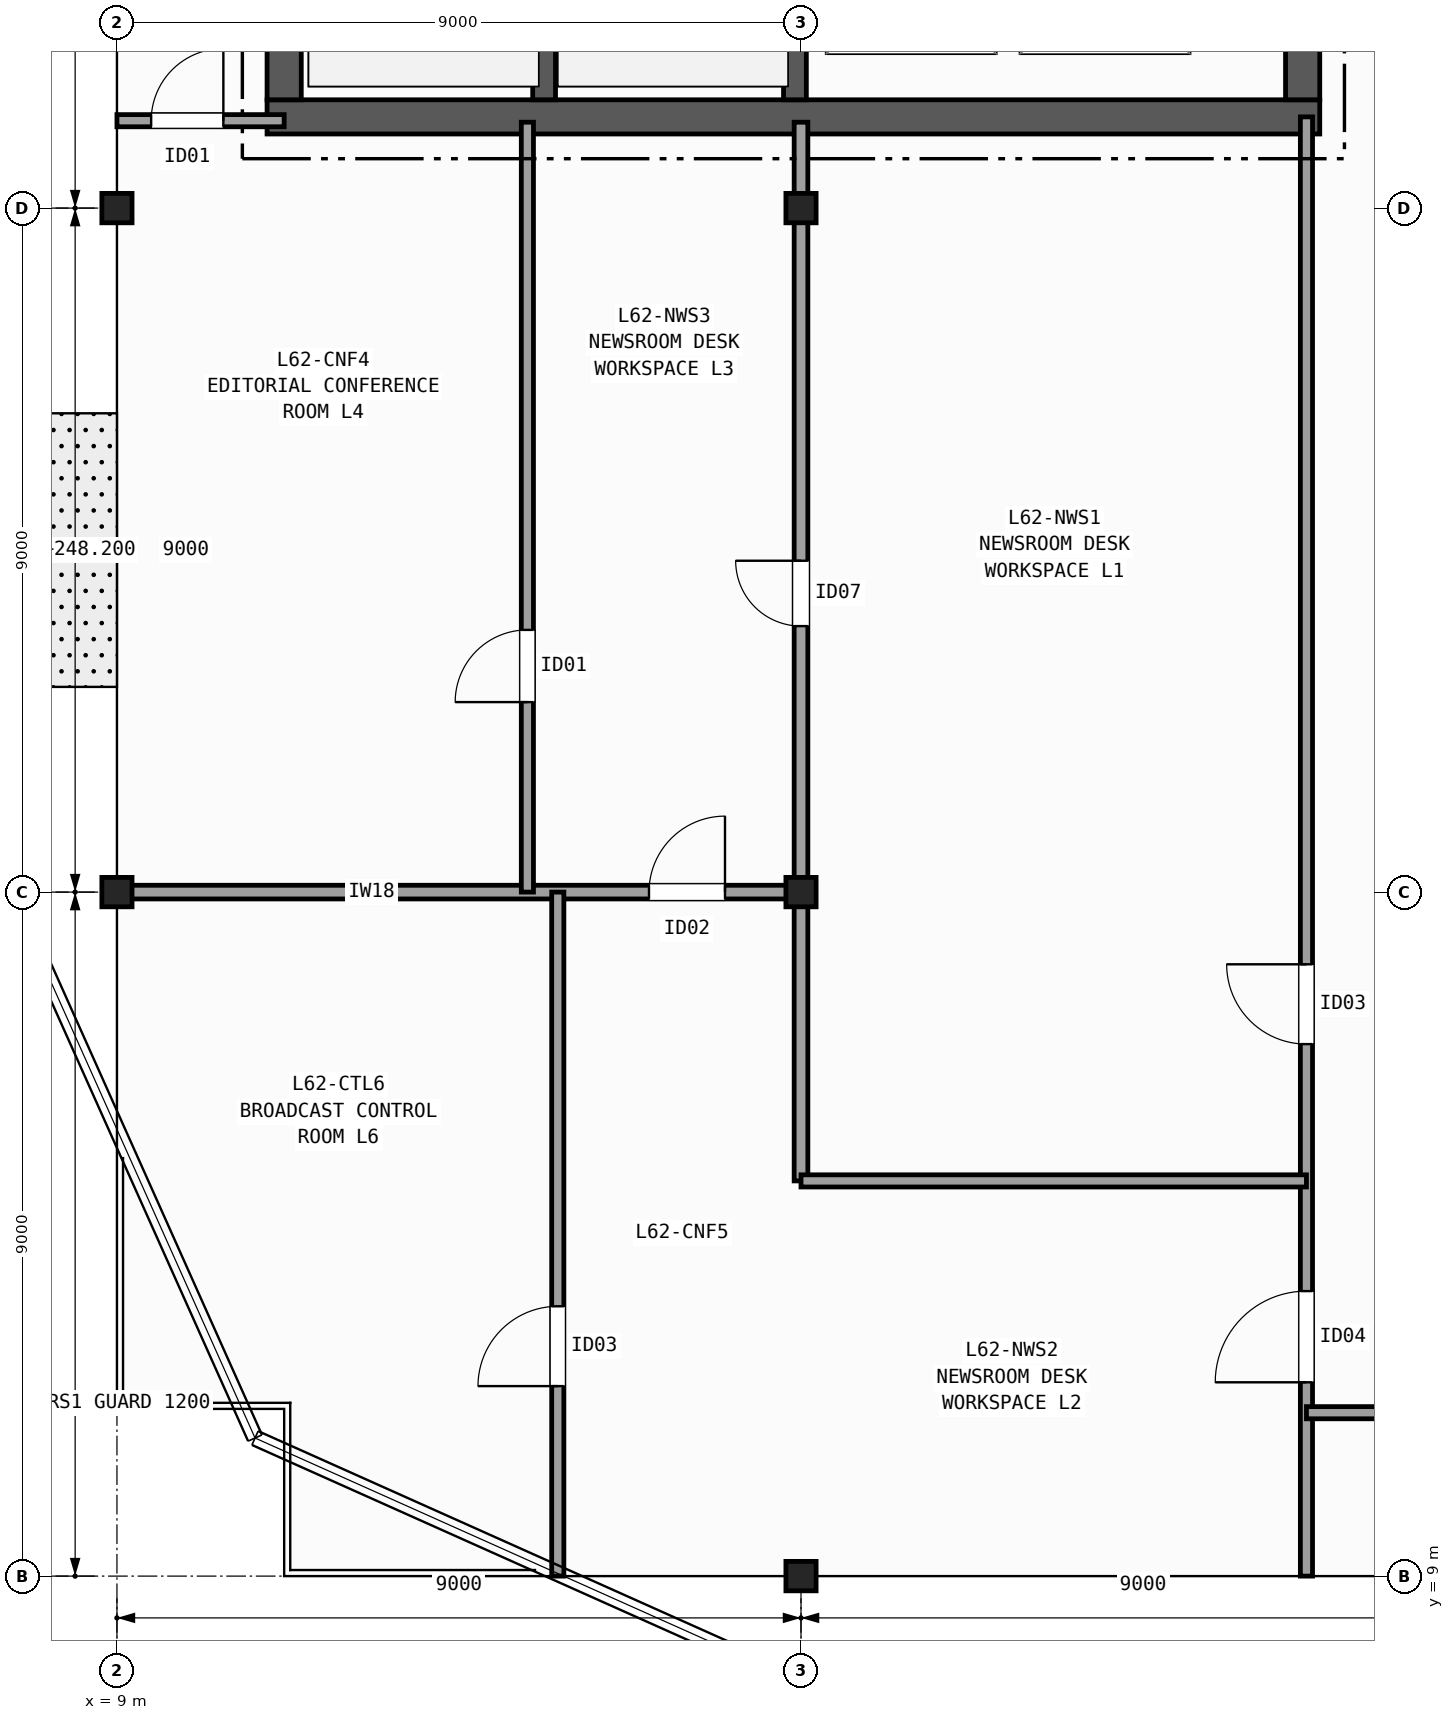
"""IFC4 building model, lengths in metres.
Left out: names, types, materials, properties, quantities, classifications, styles, units other than length and angle.
Written with IfcOpenShell. Run it as: python <this file> out.ifc"""

import sys

from ifc_helpers import new_model, si_unit, direction, frame, frame_2d, origin, origin_2d, place, context, subcontext, project, spatial, rectangle, i_section, extrude, element, fill, save


model = new_model("IFC4")
c1 = context("Model", 3, precision=1e-05, world=origin(), true_north=direction((0.0, 1.0)))
c2 = subcontext(c1, "Body", "Model", "MODEL_VIEW")
j1 = project(units=[si_unit("LENGTHUNIT", "METRE"), si_unit("PLANEANGLEUNIT", "RADIAN")], contexts=[c1])
p1 = place(None, origin())
s1 = spatial("IfcSite", under=j1, at=p1, CompositionType="ELEMENT")
p2 = place(p1, origin())
s2 = spatial("IfcBuilding", under=s1, at=p2, CompositionType="ELEMENT")
p3 = place(p2, frame((0.0, 0.0, 248.2)))
s3 = spatial("IfcBuildingStorey", under=s2, at=p3, CompositionType="ELEMENT", Elevation=248.2)
for number, where, z_axis, x_axis in (
    (1, (9.0, 18.0, 0.0), (0.0, 0.0, 1.0), (1.0, 0.0, 0.0)),
    (2, (9.0, 27.0, 0.0), (0.0, 0.0, 1.0), (1.0, 0.0, 0.0)),
    (3, (18.0, 9.0, 0.0), (0.0, 0.0, 1.0), (1.0, 0.0, 0.0)),
    (4, (18.0, 18.0, 0.0), (0.0, 0.0, 1.0), (1.0, 0.0, 0.0)),
    (5, (18.0, 27.0, 0.0), (0.0, 0.0, 1.0), (1.0, 0.0, 0.0)),
):
    element("IfcColumn", number, at=place(p3, frame(where, z_axis=z_axis, x_axis=x_axis)), inside=s3, PredefinedType="COLUMN", context=c2, shape_type="SweptSolid", body=[
        extrude(i_section(OverallWidth=0.397, OverallDepth=0.387, WebThickness=0.021, FlangeThickness=0.033, FilletRadius=0.015, at=origin_2d()), origin(), (0.0, 0.0, 1.0), 3.7),
    ])
p4 = place(p3, frame((10.975, 28.2, 0.0), z_axis=(0.0, 0.0, 1.0), x_axis=(1.0, 0.0, 0.0)))
e6 = element("IfcWall", 6, at=p4, inside=s3, PredefinedType="SHEAR", context=c2, shape_type="SweptSolid", body=[
    extrude(rectangle(XDim=13.85, YDim=0.45, at=frame_2d((6.925, 0.0))), origin(), (0.0, 0.0, 1.0), 3.42),
])
p5 = place(p3, frame((11.2, 42.175, 0.0), z_axis=(0.0, 0.0, 1.0), x_axis=(0.0, -1.0, 0.0)))
e7 = element("IfcWall", 7, at=p5, inside=s3, PredefinedType="SHEAR", context=c2, shape_type="SweptSolid", body=[
    extrude(rectangle(XDim=13.75, YDim=0.45, at=frame_2d((6.875, 0.0))), origin(), (0.0, 0.0, 1.0), 3.42),
])
p6 = place(p3, frame((24.6, 28.425, 0.0), z_axis=(0.0, 0.0, 1.0), x_axis=(0.0, 1.0, 0.0)))
e8 = element("IfcWall", 8, at=p6, inside=s3, PredefinedType="SHEAR", context=c2, shape_type="SweptSolid", body=[
    extrude(rectangle(XDim=13.75, YDim=0.45, at=frame_2d((6.875, 0.0))), origin(), (0.0, 0.0, 1.0), 3.42),
])
p7 = place(p6, frame((3.375, 0.0, 0.0)))
e9 = element("IfcOpeningElement", 9, at=p7, cuts=e8, PredefinedType="OPENING", context=c2, shape_type="SweptSolid", body=[
    extrude(rectangle(XDim=1.5, YDim=2.2, at=frame_2d((0.75, 1.1))), frame((0.0, 0.235, 0.0), z_axis=(0.0, -1.0, 0.0), x_axis=(1.0, 0.0, 0.0)), (0.0, 0.0, 1.0), 0.47),
])
p8 = place(p6, frame((9.975, 0.0, 0.0)))
e10 = element("IfcOpeningElement", 10, at=p8, cuts=e8, PredefinedType="OPENING", context=c2, shape_type="SweptSolid", body=[
    extrude(rectangle(XDim=0.9, YDim=2.1, at=frame_2d((0.45, 1.05))), frame((0.0, 0.235, 0.0), z_axis=(0.0, -1.0, 0.0), x_axis=(1.0, 0.0, 0.0)), (0.0, 0.0, 1.0), 0.47),
])
p9 = place(p6, frame((12.075, 0.0, 0.0)))
e11 = element("IfcOpeningElement", 11, at=p9, cuts=e8, PredefinedType="OPENING", context=c2, shape_type="SweptSolid", body=[
    extrude(rectangle(XDim=0.9, YDim=2.1, at=frame_2d((0.45, 1.05))), frame((0.0, 0.235, 0.0), z_axis=(0.0, -1.0, 0.0), x_axis=(1.0, 0.0, 0.0)), (0.0, 0.0, 1.0), 0.47),
])
p10 = place(p3, frame((14.62, 28.425, 0.0), z_axis=(0.0, 0.0, 1.0), x_axis=(0.0, 1.0, 0.0)))
e12 = element("IfcWall", 12, at=p10, inside=s3, PredefinedType="SHEAR", context=c2, shape_type="SweptSolid", body=[
    extrude(rectangle(XDim=9.025, YDim=0.3, at=frame_2d((4.512, 0.0))), origin(), (0.0, 0.0, 1.0), 3.42),
])
p11 = place(p3, frame((17.92, 42.175, 0.0), z_axis=(0.0, 0.0, 1.0), x_axis=(0.0, -1.0, 0.0)))
e13 = element("IfcWall", 13, at=p11, inside=s3, PredefinedType="SHEAR", context=c2, shape_type="SweptSolid", body=[
    extrude(rectangle(XDim=13.75, YDim=0.3, at=frame_2d((6.875, 0.0))), origin(), (0.0, 0.0, 1.0), 3.42),
])
p12 = place(p11, frame((2.0, 0.0, 0.0)))
e14 = element("IfcOpeningElement", 14, at=p12, cuts=e13, PredefinedType="OPENING", context=c2, shape_type="SweptSolid", body=[
    extrude(rectangle(XDim=1.15, YDim=2.15, at=frame_2d((0.575, 1.075))), frame((0.0, 0.16, 0.0), z_axis=(0.0, -1.0, 0.0), x_axis=(1.0, 0.0, 0.0)), (0.0, 0.0, 1.0), 0.32),
])
p13 = place(p3, frame((9.0, 28.15, 0.0), z_axis=(0.0, 0.0, 1.0), x_axis=(1.0, 0.0, 0.0)))
e15 = element("IfcWall", 15, at=p13, inside=s3, PredefinedType="PARTITIONING", context=c2, shape_type="SweptSolid", body=[
    extrude(rectangle(XDim=2.2, YDim=0.16, at=frame_2d((1.1, 0.0))), origin(), (0.0, 0.0, 1.0), 2.707),
])
p14 = place(p13, frame((0.45, 0.0, 0.0)))
e16 = element("IfcOpeningElement", 16, at=p14, cuts=e15, PredefinedType="OPENING", context=c2, shape_type="SweptSolid", body=[
    extrude(rectangle(XDim=0.95, YDim=2.1, at=frame_2d((0.475, 1.05))), frame((0.0, 0.09, 0.0), z_axis=(0.0, -1.0, 0.0), x_axis=(1.0, 0.0, 0.0)), (0.0, 0.0, 1.0), 0.18),
])
p15 = place(p3, frame((24.65, 9.0, 0.0), z_axis=(0.0, 0.0, 1.0), x_axis=(0.0, 1.0, 0.0)))
e17 = element("IfcWall", 17, at=p15, inside=s3, PredefinedType="PARTITIONING", context=c2, shape_type="SweptSolid", body=[
    extrude(rectangle(XDim=19.2, YDim=0.16, at=frame_2d((9.6, 0.0))), origin(), (0.0, 0.0, 1.0), 2.707),
])
p16 = place(p15, frame((7.0, 0.0, 0.0)))
e18 = element("IfcOpeningElement", 18, at=p16, cuts=e17, PredefinedType="OPENING", context=c2, shape_type="SweptSolid", body=[
    extrude(rectangle(XDim=1.05, YDim=2.15, at=frame_2d((0.525, 1.075))), frame((0.0, 0.09, 0.0), z_axis=(0.0, -1.0, 0.0), x_axis=(1.0, 0.0, 0.0)), (0.0, 0.0, 1.0), 0.18),
])
p17 = place(p15, frame((2.55, 0.0, 0.0)))
e19 = element("IfcOpeningElement", 19, at=p17, cuts=e17, PredefinedType="OPENING", context=c2, shape_type="SweptSolid", body=[
    extrude(rectangle(XDim=1.2, YDim=2.15, at=frame_2d((0.6, 1.075))), frame((0.0, 0.09, 0.0), z_axis=(0.0, -1.0, 0.0), x_axis=(1.0, 0.0, 0.0)), (0.0, 0.0, 1.0), 0.18),
])
p18 = place(p3, frame((9.0, 18.0, 0.0), z_axis=(0.0, 0.0, 1.0), x_axis=(1.0, 0.0, 0.0)))
e20 = element("IfcWall", 20, at=p18, inside=s3, PredefinedType="PARTITIONING", context=c2, shape_type="SweptSolid", body=[
    extrude(rectangle(XDim=9.08, YDim=0.18, at=frame_2d((4.54, 0.0))), origin(), (0.0, 0.0, 1.0), 2.707),
])
p19 = place(p18, frame((7.0, 0.0, 0.0)))
e21 = element("IfcOpeningElement", 21, at=p19, cuts=e20, PredefinedType="OPENING", context=c2, shape_type="SweptSolid", body=[
    extrude(rectangle(XDim=1.0, YDim=2.1, at=frame_2d((0.5, 1.05))), frame((0.0, 0.1, 0.0), z_axis=(0.0, -1.0, 0.0), x_axis=(1.0, 0.0, 0.0)), (0.0, 0.0, 1.0), 0.2),
])
p20 = place(p3, frame((18.0, 14.2, 0.0), z_axis=(0.0, 0.0, 1.0), x_axis=(0.0, 1.0, 0.0)))
e22 = element("IfcWall", 22, at=p20, inside=s3, PredefinedType="PARTITIONING", context=c2, shape_type="SweptSolid", body=[
    extrude(rectangle(XDim=13.93, YDim=0.18, at=frame_2d((6.965, 0.0))), origin(), (0.0, 0.0, 1.0), 2.789),
])
p21 = place(p20, frame((7.3, 0.0, 0.0)))
e23 = element("IfcOpeningElement", 23, at=p21, cuts=e22, PredefinedType="OPENING", context=c2, shape_type="SweptSolid", body=[
    extrude(rectangle(XDim=0.86, YDim=2.05, at=frame_2d((0.43, 1.025))), frame((0.0, 0.1, 0.0), z_axis=(0.0, -1.0, 0.0), x_axis=(1.0, 0.0, 0.0)), (0.0, 0.0, 1.0), 0.2),
])
p22 = place(p3, frame((18.0, 14.2, 0.0), z_axis=(0.0, 0.0, 1.0), x_axis=(1.0, 0.0, 0.0)))
e24 = element("IfcWall", 24, at=p22, inside=s3, PredefinedType="PARTITIONING", context=c2, shape_type="SweptSolid", body=[
    extrude(rectangle(XDim=6.65, YDim=0.16, at=frame_2d((3.325, 0.0))), origin(), (0.0, 0.0, 1.0), 2.789),
])
p23 = place(p3, frame((14.4, 18.0, 0.0), z_axis=(0.0, 0.0, 1.0), x_axis=(0.0, 1.0, 0.0)))
e25 = element("IfcWall", 25, at=p23, inside=s3, PredefinedType="PARTITIONING", context=c2, shape_type="SweptSolid", body=[
    extrude(rectangle(XDim=10.13, YDim=0.16, at=frame_2d((5.065, 0.0))), origin(), (0.0, 0.0, 1.0), 2.789),
])
p24 = place(p23, frame((2.5, 0.0, 0.0)))
e26 = element("IfcOpeningElement", 26, at=p24, cuts=e25, PredefinedType="OPENING", context=c2, shape_type="SweptSolid", body=[
    extrude(rectangle(XDim=0.95, YDim=2.1, at=frame_2d((0.475, 1.05))), frame((0.0, 0.09, 0.0), z_axis=(0.0, -1.0, 0.0), x_axis=(1.0, 0.0, 0.0)), (0.0, 0.0, 1.0), 0.18),
])
p25 = place(p3, frame((14.8, 9.0, 0.0), z_axis=(0.0, 0.0, 1.0), x_axis=(0.0, 1.0, 0.0)))
e27 = element("IfcWall", 27, at=p25, inside=s3, PredefinedType="PARTITIONING", context=c2, shape_type="SweptSolid", body=[
    extrude(rectangle(XDim=9.0, YDim=0.16, at=frame_2d((4.5, 0.0))), origin(), (0.0, 0.0, 1.0), 2.789),
])
p26 = place(p25, frame((2.5, 0.0, 0.0)))
e28 = element("IfcOpeningElement", 28, at=p26, cuts=e27, PredefinedType="OPENING", context=c2, shape_type="SweptSolid", body=[
    extrude(rectangle(XDim=1.05, YDim=2.15, at=frame_2d((0.525, 1.075))), frame((0.0, 0.09, 0.0), z_axis=(0.0, -1.0, 0.0), x_axis=(1.0, 0.0, 0.0)), (0.0, 0.0, 1.0), 0.18),
])
p27 = place(p3, frame((24.65, 11.15, 0.0), z_axis=(0.0, 0.0, 1.0), x_axis=(1.0, 0.0, 0.0)))
e29 = element("IfcWall", 29, at=p27, inside=s3, PredefinedType="PARTITIONING", context=c2, shape_type="SweptSolid", body=[
    extrude(rectangle(XDim=4.75, YDim=0.16, at=frame_2d((2.375, 0.0))), origin(), (0.0, 0.0, 1.0), 2.792),
])
p28 = place(p27, frame((1.2, 0.0, 0.0)))
e30 = element("IfcOpeningElement", 30, at=p28, cuts=e29, PredefinedType="OPENING", context=c2, shape_type="SweptSolid", body=[
    extrude(rectangle(XDim=1.2, YDim=2.15, at=frame_2d((0.6, 1.075))), frame((0.0, 0.09, 0.0), z_axis=(0.0, -1.0, 0.0), x_axis=(1.0, 0.0, 0.0)), (0.0, 0.0, 1.0), 0.18),
])
p29 = place(p14, origin())
e31 = element("IfcDoor", 31, at=p29, inside=s3, OperationType="SINGLE_SWING_RIGHT", PredefinedType="DOOR", context=c2, shape_type="SweptSolid", body=[
    extrude(rectangle(XDim=0.95, YDim=2.1, at=frame_2d((0.475, 1.05))), frame((0.0, 0.025, 0.0), z_axis=(0.0, -1.0, 0.0), x_axis=(1.0, 0.0, 0.0)), (0.0, 0.0, 1.0), 0.05),
])
fill(e16, e31)
p30 = place(p16, origin())
e32 = element("IfcDoor", 32, at=p30, inside=s3, OperationType="SINGLE_SWING_RIGHT", PredefinedType="DOOR", context=c2, shape_type="SweptSolid", body=[
    extrude(rectangle(XDim=1.05, YDim=2.15, at=frame_2d((0.525, 1.075))), frame((0.0, 0.025, 0.0), z_axis=(0.0, -1.0, 0.0), x_axis=(1.0, 0.0, 0.0)), (0.0, 0.0, 1.0), 0.05),
])
fill(e18, e32)
p31 = place(p17, origin())
e33 = element("IfcDoor", 33, at=p31, inside=s3, OperationType="SINGLE_SWING_LEFT", PredefinedType="DOOR", context=c2, shape_type="SweptSolid", body=[
    extrude(rectangle(XDim=1.2, YDim=2.15, at=frame_2d((0.6, 1.075))), frame((0.0, 0.025, 0.0), z_axis=(0.0, -1.0, 0.0), x_axis=(1.0, 0.0, 0.0)), (0.0, 0.0, 1.0), 0.05),
])
fill(e19, e33)
p32 = place(p21, origin())
e34 = element("IfcDoor", 34, at=p32, inside=s3, OperationType="SINGLE_SWING_RIGHT", PredefinedType="DOOR", context=c2, shape_type="SweptSolid", body=[
    extrude(rectangle(XDim=0.86, YDim=2.05, at=frame_2d((0.43, 1.025))), frame((0.0, 0.025, 0.0), z_axis=(0.0, -1.0, 0.0), x_axis=(1.0, 0.0, 0.0)), (0.0, 0.0, 1.0), 0.05),
])
fill(e23, e34)
p33 = place(p24, origin())
e35 = element("IfcDoor", 35, at=p33, inside=s3, OperationType="SINGLE_SWING_LEFT", PredefinedType="DOOR", context=c2, shape_type="SweptSolid", body=[
    extrude(rectangle(XDim=0.95, YDim=2.1, at=frame_2d((0.475, 1.05))), frame((0.0, 0.025, 0.0), z_axis=(0.0, -1.0, 0.0), x_axis=(1.0, 0.0, 0.0)), (0.0, 0.0, 1.0), 0.05),
])
fill(e26, e35)
p34 = place(p19, origin())
e36 = element("IfcDoor", 36, at=p34, inside=s3, OperationType="SINGLE_SWING_RIGHT", PredefinedType="DOOR", context=c2, shape_type="SweptSolid", body=[
    extrude(rectangle(XDim=1.0, YDim=2.1, at=frame_2d((0.5, 1.05))), frame((0.0, 0.025, 0.0), z_axis=(0.0, -1.0, 0.0), x_axis=(1.0, 0.0, 0.0)), (0.0, 0.0, 1.0), 0.05),
])
fill(e21, e36)
p35 = place(p26, origin())
e37 = element("IfcDoor", 37, at=p35, inside=s3, OperationType="SINGLE_SWING_LEFT", PredefinedType="DOOR", context=c2, shape_type="SweptSolid", body=[
    extrude(rectangle(XDim=1.05, YDim=2.15, at=frame_2d((0.525, 1.075))), frame((0.0, 0.025, 0.0), z_axis=(0.0, -1.0, 0.0), x_axis=(1.0, 0.0, 0.0)), (0.0, 0.0, 1.0), 0.05),
])
fill(e28, e37)
save(model, sys.argv[1])
